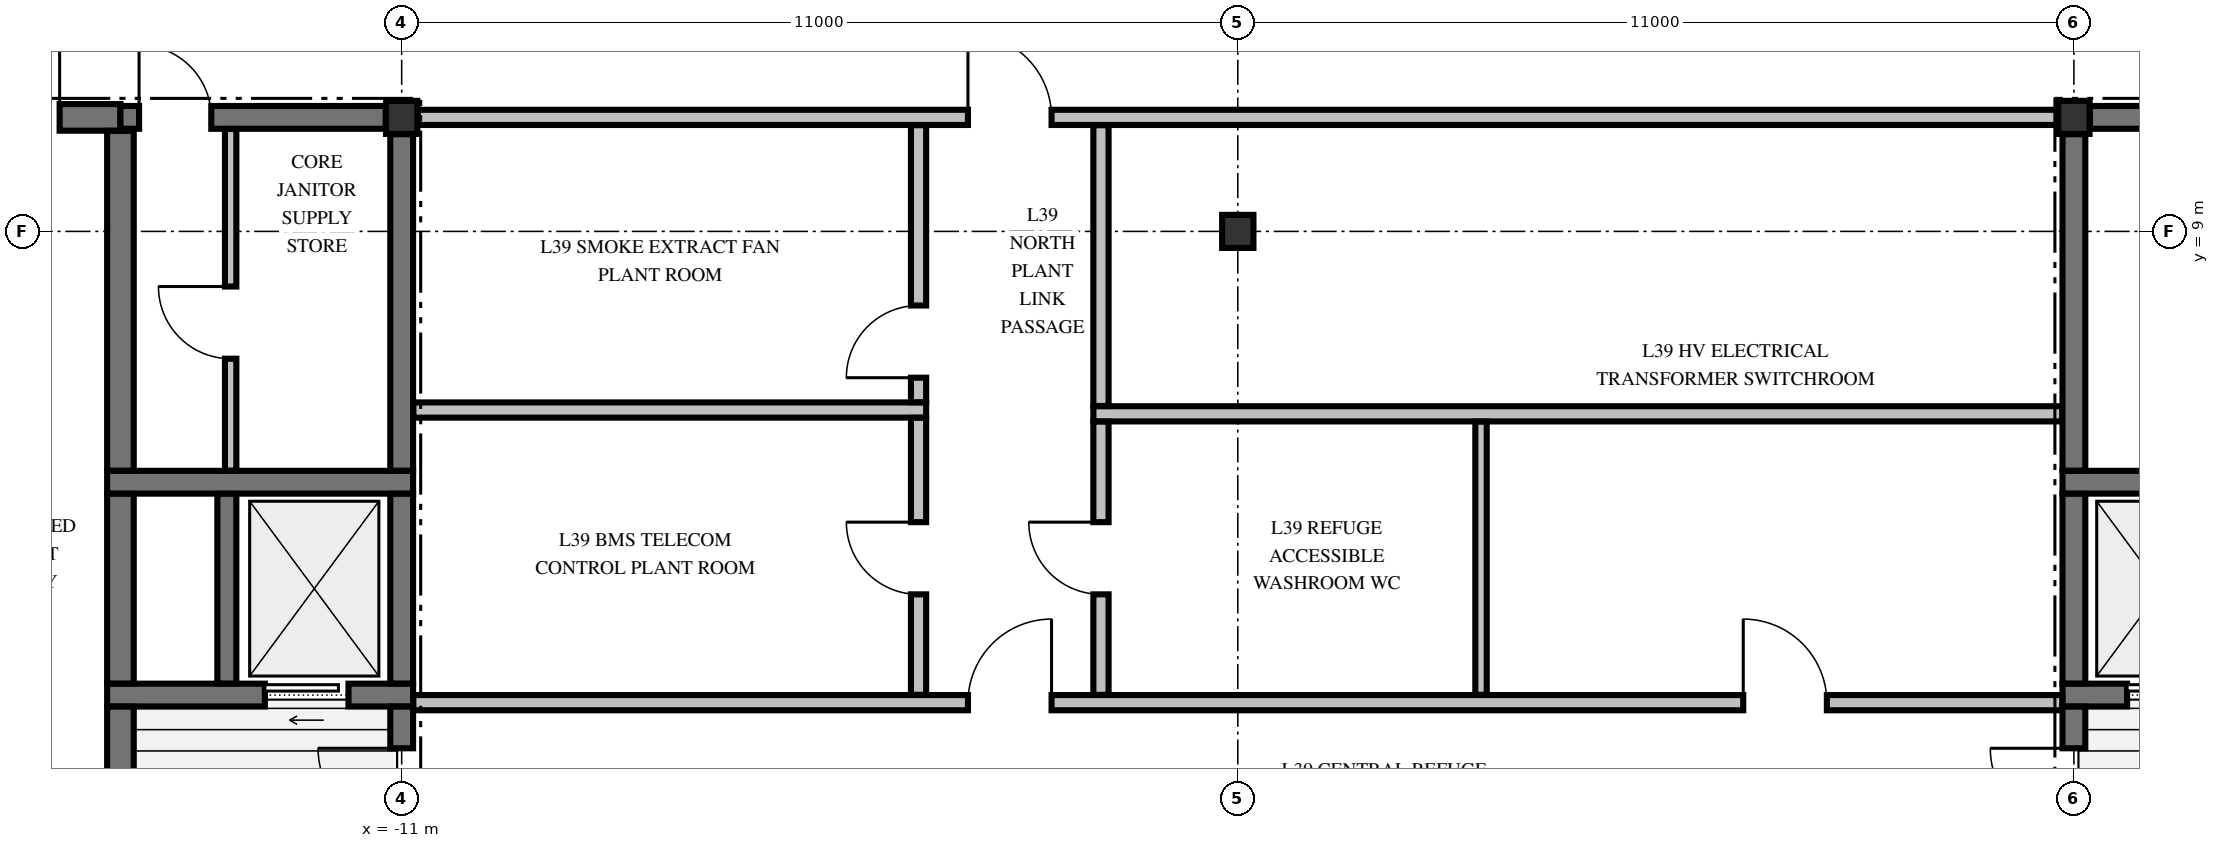
"""IFC4 building model, lengths in metres.
Left out: names, types, materials, properties, quantities, classifications, styles, units other than length and angle.
Written with IfcOpenShell. Run it as: python <this file> out.ifc"""

import sys

from ifc_helpers import new_model, si_unit, direction, frame, frame_2d, origin, origin_2d, place, context, subcontext, project, spatial, rectangle, i_section, extrude, element, fill, save


model = new_model("IFC4")
c1 = context("Model", 3, precision=1e-05, world=origin(), true_north=direction((0.0, 1.0)))
c2 = subcontext(c1, "Body", "Model", "MODEL_VIEW")
j1 = project(units=[si_unit("LENGTHUNIT", "METRE"), si_unit("PLANEANGLEUNIT", "RADIAN")], contexts=[c1])
p1 = place(None, origin())
s1 = spatial("IfcSite", under=j1, at=p1, CompositionType="ELEMENT")
p2 = place(p1, origin())
s2 = spatial("IfcBuilding", under=s1, at=p2, CompositionType="ELEMENT")
p3 = place(p2, frame((0.0, 0.0, 153.48)))
s3 = spatial("IfcBuildingStorey", under=s2, at=p3, CompositionType="ELEMENT", Elevation=153.48)
for number, where, z_axis, x_axis in (
    (1, (-11.0, 10.5, -0.425), (0.0, 0.0, 1.0), (1.0, 0.0, 0.0)),
    (2, (11.0, 10.5, -0.425), (0.0, 0.0, 1.0), (1.0, 0.0, 0.0)),
    (3, (0.0, 9.0, -0.425), (0.0, 0.0, 1.0), (1.0, 0.0, 0.0)),
):
    element("IfcColumn", number, at=place(p3, frame(where, z_axis=z_axis, x_axis=x_axis)), inside=s3, PredefinedType="COLUMN", context=c2, shape_type="SweptSolid", body=[
        extrude(i_section(OverallWidth=0.412, OverallDepth=0.435, WebThickness=0.036, FlangeThickness=0.058, FilletRadius=0.015, at=origin_2d()), origin(), (0.0, 0.0, 1.0), 4.76),
    ])
p4 = place(p3, frame((-14.875, 2.9, 0.0), z_axis=(0.0, 0.0, 1.0), x_axis=(1.0, 0.0, 0.0)))
e4 = element("IfcWall", 4, at=p4, inside=s3, PredefinedType="SHEAR", context=c2, shape_type="SweptSolid", body=[
    extrude(rectangle(XDim=4.025, YDim=0.3, at=frame_2d((2.012, 0.0))), origin(), (0.0, 0.0, 1.0), 4.335),
])
p5 = place(p4, frame((2.075, 0.0, 0.0)))
e5 = element("IfcOpeningElement", 5, at=p5, cuts=e4, PredefinedType="OPENING", context=c2, shape_type="SweptSolid", body=[
    extrude(rectangle(XDim=1.1, YDim=2.2, at=frame_2d((0.55, 1.1))), frame((0.0, 0.16, 0.0), z_axis=(0.0, -1.0, 0.0), x_axis=(1.0, 0.0, 0.0)), (0.0, 0.0, 1.0), 0.32),
])
p6 = place(p3, frame((10.85, 2.9, 0.0), z_axis=(0.0, 0.0, 1.0), x_axis=(1.0, 0.0, 0.0)))
e6 = element("IfcWall", 6, at=p6, inside=s3, PredefinedType="SHEAR", context=c2, shape_type="SweptSolid", body=[
    extrude(rectangle(XDim=4.025, YDim=0.3, at=frame_2d((2.012, 0.0))), origin(), (0.0, 0.0, 1.0), 4.335),
])
p7 = place(p6, frame((0.85, 0.0, 0.0)))
e7 = element("IfcOpeningElement", 7, at=p7, cuts=e6, PredefinedType="OPENING", context=c2, shape_type="SweptSolid", body=[
    extrude(rectangle(XDim=1.1, YDim=2.2, at=frame_2d((0.55, 1.1))), frame((0.0, 0.16, 0.0), z_axis=(0.0, -1.0, 0.0), x_axis=(1.0, 0.0, 0.0)), (0.0, 0.0, 1.0), 0.32),
])
for number, where, z_axis, x_axis in (
    (8, (-14.875, 5.7, 0.0), (0.0, 0.0, 1.0), (1.0, 0.0, 0.0)),
    (9, (10.85, 5.7, 0.0), (0.0, 0.0, 1.0), (1.0, 0.0, 0.0)),
):
    element("IfcWall", number, at=place(p3, frame(where, z_axis=z_axis, x_axis=x_axis)), inside=s3, PredefinedType="SHEAR", context=c2, shape_type="SweptSolid", body=[
        extrude(rectangle(XDim=4.025, YDim=0.3, at=frame_2d((2.012, 0.0))), origin(), (0.0, 0.0, 1.0), 4.335),
    ])
p8 = place(p3, frame((-19.79, 10.5, 0.0), z_axis=(0.0, 0.0, 1.0), x_axis=(1.0, 0.0, 0.0)))
e10 = element("IfcWall", 10, at=p8, inside=s3, PredefinedType="SHEAR", context=c2, shape_type="SweptSolid", body=[
    extrude(rectangle(XDim=5.09, YDim=0.35, at=frame_2d((2.545, 0.0))), origin(), (0.0, 0.0, 1.0), 4.335),
])
p9 = place(p8, frame((0.79, 0.0, 0.0)))
e11 = element("IfcOpeningElement", 11, at=p9, cuts=e10, PredefinedType="OPENING", context=c2, shape_type="SweptSolid", body=[
    extrude(rectangle(XDim=0.95, YDim=2.02, at=frame_2d((0.475, 1.01))), frame((0.0, 0.185, 0.0), z_axis=(0.0, -1.0, 0.0), x_axis=(1.0, 0.0, 0.0)), (0.0, 0.0, 1.0), 0.37),
])
p10 = place(p8, frame((3.34, 0.0, 0.0)))
e12 = element("IfcOpeningElement", 12, at=p10, cuts=e10, PredefinedType="OPENING", context=c2, shape_type="SweptSolid", body=[
    extrude(rectangle(XDim=0.95, YDim=2.02, at=frame_2d((0.475, 1.01))), frame((0.0, 0.185, 0.0), z_axis=(0.0, -1.0, 0.0), x_axis=(1.0, 0.0, 0.0)), (0.0, 0.0, 1.0), 0.37),
])
p11 = place(p3, frame((-14.7, 10.5, 0.0), z_axis=(0.0, 0.0, 1.0), x_axis=(1.0, 0.0, 0.0)))
e13 = element("IfcWall", 13, at=p11, inside=s3, PredefinedType="SHEAR", context=c2, shape_type="SweptSolid", body=[
    extrude(rectangle(XDim=3.49, YDim=0.3, at=frame_2d((1.745, 0.0))), origin(), (0.0, 0.0, 1.0), 4.335),
])
p12 = place(p11, frame((0.245, 0.0, 0.0)))
e14 = element("IfcOpeningElement", 14, at=p12, cuts=e13, PredefinedType="OPENING", context=c2, shape_type="SweptSolid", body=[
    extrude(rectangle(XDim=0.95, YDim=2.02, at=frame_2d((0.475, 1.01))), frame((0.0, 0.16, 0.0), z_axis=(0.0, -1.0, 0.0), x_axis=(1.0, 0.0, 0.0)), (0.0, 0.0, 1.0), 0.32),
])
p13 = place(p3, frame((11.21, 10.5, 0.0), z_axis=(0.0, 0.0, 1.0), x_axis=(1.0, 0.0, 0.0)))
e15 = element("IfcWall", 15, at=p13, inside=s3, PredefinedType="SHEAR", context=c2, shape_type="SweptSolid", body=[
    extrude(rectangle(XDim=3.49, YDim=0.3, at=frame_2d((1.745, 0.0))), origin(), (0.0, 0.0, 1.0), 4.335),
])
p14 = place(p13, frame((1.765, 0.0, 0.0)))
e16 = element("IfcOpeningElement", 16, at=p14, cuts=e15, PredefinedType="OPENING", context=c2, shape_type="SweptSolid", body=[
    extrude(rectangle(XDim=0.95, YDim=2.02, at=frame_2d((0.475, 1.01))), frame((0.0, 0.16, 0.0), z_axis=(0.0, -1.0, 0.0), x_axis=(1.0, 0.0, 0.0)), (0.0, 0.0, 1.0), 0.32),
])
p15 = place(p3, frame((-10.847, 2.8, 0.0), z_axis=(0.0, 0.0, 1.0), x_axis=(1.0, 0.0, 0.0)))
e17 = element("IfcWall", 17, at=p15, inside=s3, PredefinedType="PARTITIONING", context=c2, shape_type="SweptSolid", body=[
    extrude(rectangle(XDim=21.694, YDim=0.2, at=frame_2d((10.847, 0.0))), origin(), (0.0, 0.0, 1.0), 4.335),
])
p16 = place(p15, frame((7.297, 0.0, 0.0)))
e18 = element("IfcOpeningElement", 18, at=p16, cuts=e17, PredefinedType="OPENING", context=c2, shape_type="SweptSolid", body=[
    extrude(rectangle(XDim=1.1, YDim=2.15, at=frame_2d((0.55, 1.075))), frame((0.0, 0.11, 0.0), z_axis=(0.0, -1.0, 0.0), x_axis=(1.0, 0.0, 0.0)), (0.0, 0.0, 1.0), 0.22),
])
p17 = place(p15, frame((17.497, 0.0, 0.0)))
e19 = element("IfcOpeningElement", 19, at=p17, cuts=e17, PredefinedType="OPENING", context=c2, shape_type="SweptSolid", body=[
    extrude(rectangle(XDim=1.1, YDim=2.15, at=frame_2d((0.55, 1.075))), frame((0.0, 0.11, 0.0), z_axis=(0.0, -1.0, 0.0), x_axis=(1.0, 0.0, 0.0)), (0.0, 0.0, 1.0), 0.22),
])
p18 = place(p3, frame((-1.9, 6.6, 0.0), z_axis=(0.0, 0.0, 1.0), x_axis=(1.0, 0.0, 0.0)))
e20 = element("IfcWall", 20, at=p18, inside=s3, PredefinedType="PARTITIONING", context=c2, shape_type="SweptSolid", body=[
    extrude(rectangle(XDim=12.747, YDim=0.2, at=frame_2d((6.374, 0.0))), origin(), (0.0, 0.0, 1.0), 4.335),
])
p19 = place(p3, frame((-10.847, 6.65, 0.0), z_axis=(0.0, 0.0, 1.0), x_axis=(1.0, 0.0, 0.0)))
e21 = element("IfcWall", 21, at=p19, inside=s3, PredefinedType="PARTITIONING", context=c2, shape_type="SweptSolid", body=[
    extrude(rectangle(XDim=6.747, YDim=0.2, at=frame_2d((3.374, 0.0))), origin(), (0.0, 0.0, 1.0), 4.335),
])
p20 = place(p3, frame((-10.788, 10.5, 0.0), z_axis=(0.0, 0.0, 1.0), x_axis=(1.0, 0.0, 0.0)))
e22 = element("IfcWall", 22, at=p20, inside=s3, PredefinedType="PARTITIONING", context=c2, shape_type="SweptSolid", body=[
    extrude(rectangle(XDim=21.576, YDim=0.2, at=frame_2d((10.788, 0.0))), origin(), (0.0, 0.0, 1.0), 4.335),
])
p21 = place(p20, frame((7.238, 0.0, 0.0)))
e23 = element("IfcOpeningElement", 23, at=p21, cuts=e22, PredefinedType="OPENING", context=c2, shape_type="SweptSolid", body=[
    extrude(rectangle(XDim=1.1, YDim=2.15, at=frame_2d((0.55, 1.075))), frame((0.0, 0.11, 0.0), z_axis=(0.0, -1.0, 0.0), x_axis=(1.0, 0.0, 0.0)), (0.0, 0.0, 1.0), 0.22),
])
p22 = place(p3, frame((-14.7, -0.098, 0.0), z_axis=(0.0, 0.0, 1.0), x_axis=(0.0, 1.0, 0.0)))
e24 = element("IfcWall", 24, at=p22, inside=s3, PredefinedType="SHEAR", context=c2, shape_type="SweptSolid", body=[
    extrude(rectangle(XDim=2.846, YDim=0.35, at=frame_2d((1.423, 0.0))), origin(), (0.0, 0.0, 1.0), 4.335),
])
p23 = place(p3, frame((-14.7, 3.052, 0.0), z_axis=(0.0, 0.0, 1.0), x_axis=(0.0, 1.0, 0.0)))
e25 = element("IfcWall", 25, at=p23, inside=s3, PredefinedType="SHEAR", context=c2, shape_type="SweptSolid", body=[
    extrude(rectangle(XDim=2.496, YDim=0.35, at=frame_2d((1.248, 0.0))), origin(), (0.0, 0.0, 1.0), 4.335),
])
p24 = place(p3, frame((-14.7, 5.852, 0.0), z_axis=(0.0, 0.0, 1.0), x_axis=(0.0, 1.0, 0.0)))
e26 = element("IfcWall", 26, at=p24, inside=s3, PredefinedType="SHEAR", context=c2, shape_type="SweptSolid", body=[
    extrude(rectangle(XDim=4.471, YDim=0.35, at=frame_2d((2.235, 0.0))), origin(), (0.0, 0.0, 1.0), 4.335),
])
p25 = place(p3, frame((-13.3, 3.052, 0.0), z_axis=(0.0, 0.0, 1.0), x_axis=(0.0, 1.0, 0.0)))
e27 = element("IfcWall", 27, at=p25, inside=s3, PredefinedType="SOLIDWALL", context=c2, shape_type="SweptSolid", body=[
    extrude(rectangle(XDim=2.496, YDim=0.25, at=frame_2d((1.248, 0.0))), origin(), (0.0, 0.0, 1.0), 4.335),
])
p26 = place(p3, frame((-11.0, 0.221, 0.0), z_axis=(0.0, 0.0, 1.0), x_axis=(0.0, 1.0, 0.0)))
e28 = element("IfcWall", 28, at=p26, inside=s3, PredefinedType="SHEAR", context=c2, shape_type="SweptSolid", body=[
    extrude(rectangle(XDim=2.527, YDim=0.3, at=frame_2d((1.263, 0.0))), origin(), (0.0, 0.0, 1.0), 4.335),
])
p27 = place(p26, frame((0.878, 0.0, 0.0)))
e29 = element("IfcOpeningElement", 29, at=p27, cuts=e28, PredefinedType="OPENING", context=c2, shape_type="SweptSolid", body=[
    extrude(rectangle(XDim=1.1, YDim=2.15, at=frame_2d((0.55, 1.075))), frame((0.0, 0.16, 0.0), z_axis=(0.0, -1.0, 0.0), x_axis=(1.0, 0.0, 0.0)), (0.0, 0.0, 1.0), 0.32),
])
p28 = place(p3, frame((-11.0, 3.052, 0.0), z_axis=(0.0, 0.0, 1.0), x_axis=(0.0, 1.0, 0.0)))
e30 = element("IfcWall", 30, at=p28, inside=s3, PredefinedType="SHEAR", context=c2, shape_type="SweptSolid", body=[
    extrude(rectangle(XDim=2.496, YDim=0.3, at=frame_2d((1.248, 0.0))), origin(), (0.0, 0.0, 1.0), 4.335),
])
p29 = place(p3, frame((-11.0, 5.852, 0.0), z_axis=(0.0, 0.0, 1.0), x_axis=(0.0, 1.0, 0.0)))
e31 = element("IfcWall", 31, at=p29, inside=s3, PredefinedType="SHEAR", context=c2, shape_type="SweptSolid", body=[
    extrude(rectangle(XDim=4.427, YDim=0.3, at=frame_2d((2.213, 0.0))), origin(), (0.0, 0.0, 1.0), 4.335),
])
p30 = place(p3, frame((11.0, 0.221, 0.0), z_axis=(0.0, 0.0, 1.0), x_axis=(0.0, 1.0, 0.0)))
e32 = element("IfcWall", 32, at=p30, inside=s3, PredefinedType="SHEAR", context=c2, shape_type="SweptSolid", body=[
    extrude(rectangle(XDim=2.527, YDim=0.3, at=frame_2d((1.263, 0.0))), origin(), (0.0, 0.0, 1.0), 4.335),
])
p31 = place(p30, frame((0.878, 0.0, 0.0)))
e33 = element("IfcOpeningElement", 33, at=p31, cuts=e32, PredefinedType="OPENING", context=c2, shape_type="SweptSolid", body=[
    extrude(rectangle(XDim=1.1, YDim=2.15, at=frame_2d((0.55, 1.075))), frame((0.0, 0.16, 0.0), z_axis=(0.0, -1.0, 0.0), x_axis=(1.0, 0.0, 0.0)), (0.0, 0.0, 1.0), 0.32),
])
p32 = place(p3, frame((11.0, 3.052, 0.0), z_axis=(0.0, 0.0, 1.0), x_axis=(0.0, 1.0, 0.0)))
e34 = element("IfcWall", 34, at=p32, inside=s3, PredefinedType="SHEAR", context=c2, shape_type="SweptSolid", body=[
    extrude(rectangle(XDim=2.496, YDim=0.3, at=frame_2d((1.248, 0.0))), origin(), (0.0, 0.0, 1.0), 4.335),
])
p33 = place(p3, frame((11.0, 5.852, 0.0), z_axis=(0.0, 0.0, 1.0), x_axis=(0.0, 1.0, 0.0)))
e35 = element("IfcWall", 35, at=p33, inside=s3, PredefinedType="SHEAR", context=c2, shape_type="SweptSolid", body=[
    extrude(rectangle(XDim=4.427, YDim=0.3, at=frame_2d((2.213, 0.0))), origin(), (0.0, 0.0, 1.0), 4.335),
])
p34 = place(p3, frame((-13.25, 5.853, 0.0), z_axis=(0.0, 0.0, 1.0), x_axis=(0.0, 1.0, 0.0)))
e36 = element("IfcWall", 36, at=p34, inside=s3, PredefinedType="PARTITIONING", context=c2, shape_type="SweptSolid", body=[
    extrude(rectangle(XDim=4.494, YDim=0.15, at=frame_2d((2.247, 0.0))), origin(), (0.0, 0.0, 1.0), 4.335),
])
p35 = place(p34, frame((1.472, 0.0, 0.0)))
e37 = element("IfcOpeningElement", 37, at=p35, cuts=e36, PredefinedType="OPENING", context=c2, shape_type="SweptSolid", body=[
    extrude(rectangle(XDim=0.95, YDim=2.15, at=frame_2d((0.475, 1.075))), frame((0.0, 0.085, 0.0), z_axis=(0.0, -1.0, 0.0), x_axis=(1.0, 0.0, 0.0)), (0.0, 0.0, 1.0), 0.17),
])
p36 = place(p3, frame((-4.2, 2.903, 0.0), z_axis=(0.0, 0.0, 1.0), x_axis=(0.0, 1.0, 0.0)))
e38 = element("IfcWall", 38, at=p36, inside=s3, PredefinedType="PARTITIONING", context=c2, shape_type="SweptSolid", body=[
    extrude(rectangle(XDim=3.644, YDim=0.2, at=frame_2d((1.822, 0.0))), origin(), (0.0, 0.0, 1.0), 4.335),
])
p37 = place(p36, frame((1.322, 0.0, 0.0)))
e39 = element("IfcOpeningElement", 39, at=p37, cuts=e38, PredefinedType="OPENING", context=c2, shape_type="SweptSolid", body=[
    extrude(rectangle(XDim=0.95, YDim=2.15, at=frame_2d((0.475, 1.075))), frame((0.0, 0.11, 0.0), z_axis=(0.0, -1.0, 0.0), x_axis=(1.0, 0.0, 0.0)), (0.0, 0.0, 1.0), 0.22),
])
p38 = place(p3, frame((-4.2, 6.753, 0.0), z_axis=(0.0, 0.0, 1.0), x_axis=(0.0, 1.0, 0.0)))
e40 = element("IfcWall", 40, at=p38, inside=s3, PredefinedType="PARTITIONING", context=c2, shape_type="SweptSolid", body=[
    extrude(rectangle(XDim=3.644, YDim=0.2, at=frame_2d((1.822, 0.0))), origin(), (0.0, 0.0, 1.0), 4.335),
])
p39 = place(p38, frame((0.322, 0.0, 0.0)))
e41 = element("IfcOpeningElement", 41, at=p39, cuts=e40, PredefinedType="OPENING", context=c2, shape_type="SweptSolid", body=[
    extrude(rectangle(XDim=0.95, YDim=2.15, at=frame_2d((0.475, 1.075))), frame((0.0, 0.11, 0.0), z_axis=(0.0, -1.0, 0.0), x_axis=(1.0, 0.0, 0.0)), (0.0, 0.0, 1.0), 0.22),
])
p40 = place(p3, frame((-1.8, 2.903, 0.0), z_axis=(0.0, 0.0, 1.0), x_axis=(0.0, 1.0, 0.0)))
e42 = element("IfcWall", 42, at=p40, inside=s3, PredefinedType="PARTITIONING", context=c2, shape_type="SweptSolid", body=[
    extrude(rectangle(XDim=3.594, YDim=0.2, at=frame_2d((1.797, 0.0))), origin(), (0.0, 0.0, 1.0), 4.335),
])
p41 = place(p40, frame((1.322, 0.0, 0.0)))
e43 = element("IfcOpeningElement", 43, at=p41, cuts=e42, PredefinedType="OPENING", context=c2, shape_type="SweptSolid", body=[
    extrude(rectangle(XDim=0.95, YDim=2.15, at=frame_2d((0.475, 1.075))), frame((0.0, 0.11, 0.0), z_axis=(0.0, -1.0, 0.0), x_axis=(1.0, 0.0, 0.0)), (0.0, 0.0, 1.0), 0.22),
])
p42 = place(p3, frame((-1.8, 6.703, 0.0), z_axis=(0.0, 0.0, 1.0), x_axis=(0.0, 1.0, 0.0)))
e44 = element("IfcWall", 44, at=p42, inside=s3, PredefinedType="PARTITIONING", context=c2, shape_type="SweptSolid", body=[
    extrude(rectangle(XDim=3.694, YDim=0.2, at=frame_2d((1.847, 0.0))), origin(), (0.0, 0.0, 1.0), 4.335),
])
p43 = place(p3, frame((3.2, 2.903, 0.0), z_axis=(0.0, 0.0, 1.0), x_axis=(0.0, 1.0, 0.0)))
e45 = element("IfcWall", 45, at=p43, inside=s3, PredefinedType="PARTITIONING", context=c2, shape_type="SweptSolid", body=[
    extrude(rectangle(XDim=3.594, YDim=0.15, at=frame_2d((1.797, 0.0))), origin(), (0.0, 0.0, 1.0), 4.335),
])
p44 = place(p27, origin())
e46 = element("IfcDoor", 46, at=p44, inside=s3, OperationType="SINGLE_SWING_RIGHT", PredefinedType="DOOR", context=c2, shape_type="SweptSolid", body=[
    extrude(rectangle(XDim=1.1, YDim=2.15, at=frame_2d((0.55, 1.075))), frame((0.0, 0.025, 0.0), z_axis=(0.0, -1.0, 0.0), x_axis=(1.0, 0.0, 0.0)), (0.0, 0.0, 1.0), 0.05),
])
fill(e29, e46)
p45 = place(p5, origin())
e47 = element("IfcDoor", 47, at=p45, inside=s3, OperationType="SLIDING_TO_LEFT", PredefinedType="DOOR", context=c2, shape_type="SweptSolid", body=[
    extrude(rectangle(XDim=1.1, YDim=2.2, at=frame_2d((0.55, 1.1))), frame((0.0, 0.025, 0.0), z_axis=(0.0, -1.0, 0.0), x_axis=(1.0, 0.0, 0.0)), (0.0, 0.0, 1.0), 0.05),
])
fill(e5, e47)
p46 = place(p31, origin())
e48 = element("IfcDoor", 48, at=p46, inside=s3, OperationType="SINGLE_SWING_RIGHT", PredefinedType="DOOR", context=c2, shape_type="SweptSolid", body=[
    extrude(rectangle(XDim=1.1, YDim=2.15, at=frame_2d((0.55, 1.075))), frame((0.0, 0.025, 0.0), z_axis=(0.0, -1.0, 0.0), x_axis=(1.0, 0.0, 0.0)), (0.0, 0.0, 1.0), 0.05),
])
fill(e33, e48)
p47 = place(p7, origin())
e49 = element("IfcDoor", 49, at=p47, inside=s3, OperationType="SLIDING_TO_RIGHT", PredefinedType="DOOR", context=c2, shape_type="SweptSolid", body=[
    extrude(rectangle(XDim=1.1, YDim=2.2, at=frame_2d((0.55, 1.1))), frame((0.0, 0.025, 0.0), z_axis=(0.0, -1.0, 0.0), x_axis=(1.0, 0.0, 0.0)), (0.0, 0.0, 1.0), 0.05),
])
fill(e7, e49)
p48 = place(p12, origin())
e50 = element("IfcDoor", 50, at=p48, inside=s3, OperationType="SINGLE_SWING_LEFT", PredefinedType="DOOR", context=c2, shape_type="SweptSolid", body=[
    extrude(rectangle(XDim=0.95, YDim=2.02, at=frame_2d((0.475, 1.01))), frame((0.0, 0.025, 0.0), z_axis=(0.0, -1.0, 0.0), x_axis=(1.0, 0.0, 0.0)), (0.0, 0.0, 1.0), 0.05),
])
fill(e14, e50)
p49 = place(p35, origin())
e51 = element("IfcDoor", 51, at=p49, inside=s3, OperationType="SINGLE_SWING_RIGHT", PredefinedType="DOOR", context=c2, shape_type="SweptSolid", body=[
    extrude(rectangle(XDim=0.95, YDim=2.15, at=frame_2d((0.475, 1.075))), frame((0.0, 0.025, 0.0), z_axis=(0.0, -1.0, 0.0), x_axis=(1.0, 0.0, 0.0)), (0.0, 0.0, 1.0), 0.05),
])
fill(e37, e51)
p50 = place(p10, origin())
e52 = element("IfcDoor", 52, at=p50, inside=s3, OperationType="SINGLE_SWING_RIGHT", PredefinedType="DOOR", context=c2, shape_type="SweptSolid", body=[
    extrude(rectangle(XDim=0.95, YDim=2.02, at=frame_2d((0.475, 1.01))), frame((0.0, 0.025, 0.0), z_axis=(0.0, -1.0, 0.0), x_axis=(1.0, 0.0, 0.0)), (0.0, 0.0, 1.0), 0.05),
])
fill(e12, e52)
p51 = place(p16, origin())
e53 = element("IfcDoor", 53, at=p51, inside=s3, OperationType="SINGLE_SWING_RIGHT", PredefinedType="DOOR", context=c2, shape_type="SweptSolid", body=[
    extrude(rectangle(XDim=1.1, YDim=2.15, at=frame_2d((0.55, 1.075))), frame((0.0, 0.025, 0.0), z_axis=(0.0, -1.0, 0.0), x_axis=(1.0, 0.0, 0.0)), (0.0, 0.0, 1.0), 0.05),
])
fill(e18, e53)
p52 = place(p21, origin())
e54 = element("IfcDoor", 54, at=p52, inside=s3, OperationType="SINGLE_SWING_LEFT", PredefinedType="DOOR", context=c2, shape_type="SweptSolid", body=[
    extrude(rectangle(XDim=1.1, YDim=2.15, at=frame_2d((0.55, 1.075))), frame((0.0, 0.025, 0.0), z_axis=(0.0, -1.0, 0.0), x_axis=(1.0, 0.0, 0.0)), (0.0, 0.0, 1.0), 0.05),
])
fill(e23, e54)
p53 = place(p37, origin())
e55 = element("IfcDoor", 55, at=p53, inside=s3, OperationType="SINGLE_SWING_RIGHT", PredefinedType="DOOR", context=c2, shape_type="SweptSolid", body=[
    extrude(rectangle(XDim=0.95, YDim=2.15, at=frame_2d((0.475, 1.075))), frame((0.0, 0.025, 0.0), z_axis=(0.0, -1.0, 0.0), x_axis=(1.0, 0.0, 0.0)), (0.0, 0.0, 1.0), 0.05),
])
fill(e39, e55)
p54 = place(p39, origin())
e56 = element("IfcDoor", 56, at=p54, inside=s3, OperationType="SINGLE_SWING_LEFT", PredefinedType="DOOR", context=c2, shape_type="SweptSolid", body=[
    extrude(rectangle(XDim=0.95, YDim=2.15, at=frame_2d((0.475, 1.075))), frame((0.0, 0.025, 0.0), z_axis=(0.0, -1.0, 0.0), x_axis=(1.0, 0.0, 0.0)), (0.0, 0.0, 1.0), 0.05),
])
fill(e41, e56)
p55 = place(p41, origin())
e57 = element("IfcDoor", 57, at=p55, inside=s3, OperationType="SINGLE_SWING_RIGHT", PredefinedType="DOOR", context=c2, shape_type="SweptSolid", body=[
    extrude(rectangle(XDim=0.95, YDim=2.15, at=frame_2d((0.475, 1.075))), frame((0.0, 0.025, 0.0), z_axis=(0.0, -1.0, 0.0), x_axis=(1.0, 0.0, 0.0)), (0.0, 0.0, 1.0), 0.05),
])
fill(e43, e57)
p56 = place(p17, origin())
e58 = element("IfcDoor", 58, at=p56, inside=s3, OperationType="SINGLE_SWING_LEFT", PredefinedType="DOOR", context=c2, shape_type="SweptSolid", body=[
    extrude(rectangle(XDim=1.1, YDim=2.15, at=frame_2d((0.55, 1.075))), frame((0.0, 0.025, 0.0), z_axis=(0.0, -1.0, 0.0), x_axis=(1.0, 0.0, 0.0)), (0.0, 0.0, 1.0), 0.05),
])
fill(e19, e58)
save(model, sys.argv[1])
